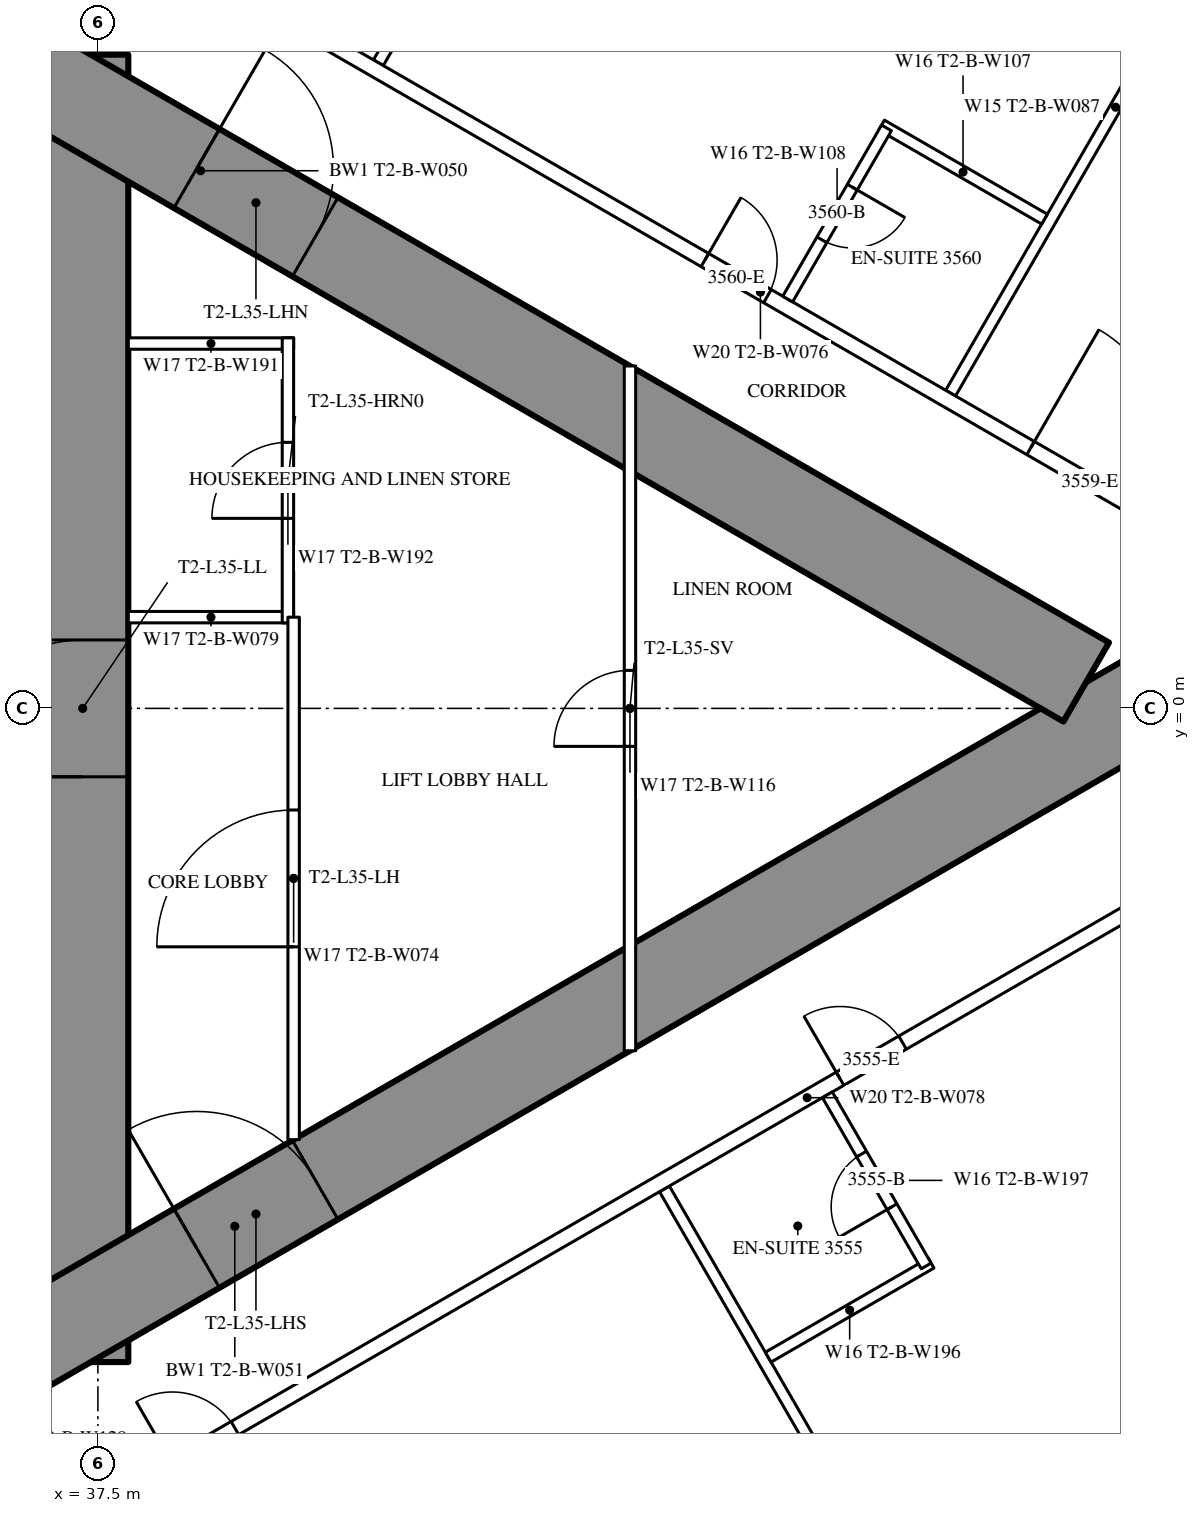
"""IFC4 building model, lengths in metres.
Left out: names, types, materials, properties, quantities, classifications, styles, units other than length and angle.
Written with IfcOpenShell. Run it as: python <this file> out.ifc"""

import sys

from ifc_helpers import new_model, si_unit, direction, frame, frame_2d, origin, place, context, subcontext, project, spatial, rectangle, extrude, element, fill, save


model = new_model("IFC4")
c1 = context("Model", 3, precision=1e-05, world=origin(), true_north=direction((0.0, 1.0)))
c2 = subcontext(c1, "Body", "Model", "MODEL_VIEW")
j1 = project(units=[si_unit("LENGTHUNIT", "METRE"), si_unit("PLANEANGLEUNIT", "RADIAN")], contexts=[c1])
p1 = place(None, origin())
s1 = spatial("IfcSite", under=j1, at=p1, CompositionType="ELEMENT")
p2 = place(p1, origin())
s2 = spatial("IfcBuilding", under=s1, at=p2, CompositionType="ELEMENT")
p3 = place(p2, frame((0.0, 0.0, 132.6)))
s3 = spatial("IfcBuildingStorey", under=s2, at=p3, CompositionType="ELEMENT", Elevation=132.6)
p4 = place(p3, frame((37.3, -8.6, 0.0), z_axis=(0.0, 0.0, 1.0), x_axis=(0.0, 1.0, 0.0)))
e1 = element("IfcWall", 1, at=p4, inside=s3, PredefinedType="SHEAR", context=c2, shape_type="SweptSolid", body=[
    extrude(rectangle(XDim=17.2, YDim=1.2, at=frame_2d((8.6, 0.0))), origin(), (0.0, 0.0, 1.0), 3.5),
])
p5 = place(p4, frame((7.7, 0.0, 0.0)))
e2 = element("IfcOpeningElement", 2, at=p5, cuts=e1, PredefinedType="OPENING", context=c2, shape_type="SweptSolid", body=[
    extrude(rectangle(XDim=1.8, YDim=2.2, at=frame_2d((0.9, 1.1))), frame((0.0, 0.61, 0.0), z_axis=(0.0, -1.0, 0.0), x_axis=(1.0, 0.0, 0.0)), (0.0, 0.0, 1.0), 1.22),
])
p6 = place(p3, frame((27.2, -13.8, 0.0), z_axis=(0.0, 0.0, 1.0), x_axis=(0.866027159892, 0.499996958321, 0.0)))
e3 = element("IfcWall", 3, at=p6, inside=s3, PredefinedType="SHEAR", context=c2, shape_type="SweptSolid", body=[
    extrude(rectangle(XDim=27.947, YDim=1.2, at=frame_2d((13.973, 0.0))), origin(), (0.0, 0.0, 1.0), 3.5),
])
p7 = place(p6, frame((4.6, 0.0, 0.0)))
e4 = element("IfcOpeningElement", 4, at=p7, cuts=e3, PredefinedType="OPENING", context=c2, shape_type="SweptSolid", body=[
    extrude(rectangle(XDim=1.0, YDim=2.2, at=frame_2d((0.5, 1.1))), frame((0.0, 0.61, 0.0), z_axis=(0.0, -1.0, 0.0), x_axis=(1.0, 0.0, 0.0)), (0.0, 0.0, 1.0), 1.22),
])
p8 = place(p6, frame((13.395, 0.0, 0.0)))
e5 = element("IfcOpeningElement", 5, at=p8, cuts=e3, PredefinedType="OPENING", context=c2, shape_type="SweptSolid", body=[
    extrude(rectangle(XDim=1.8, YDim=2.2, at=frame_2d((0.9, 1.1))), frame((0.0, 0.61, 0.0), z_axis=(0.0, -1.0, 0.0), x_axis=(1.0, 0.0, 0.0)), (0.0, 0.0, 1.0), 1.22),
])
p9 = place(p3, frame((27.2, 13.8, 0.0), z_axis=(0.0, 0.0, 1.0), x_axis=(0.866024515034, -0.500001539357, 0.0)))
e6 = element("IfcWall", 6, at=p9, inside=s3, PredefinedType="SHEAR", context=c2, shape_type="SweptSolid", body=[
    extrude(rectangle(XDim=26.907, YDim=1.2, at=frame_2d((13.454, 0.0))), origin(), (0.0, 0.0, 1.0), 3.5),
])
p10 = place(p9, frame((4.6, 0.0, 0.0)))
e7 = element("IfcOpeningElement", 7, at=p10, cuts=e6, PredefinedType="OPENING", context=c2, shape_type="SweptSolid", body=[
    extrude(rectangle(XDim=1.0, YDim=2.2, at=frame_2d((0.5, 1.1))), frame((0.0, 0.61, 0.0), z_axis=(0.0, -1.0, 0.0), x_axis=(1.0, 0.0, 0.0)), (0.0, 0.0, 1.0), 1.22),
])
p11 = place(p9, frame((13.395, 0.0, 0.0)))
e8 = element("IfcOpeningElement", 8, at=p11, cuts=e6, PredefinedType="OPENING", context=c2, shape_type="SweptSolid", body=[
    extrude(rectangle(XDim=1.8, YDim=2.2, at=frame_2d((0.9, 1.1))), frame((0.0, 0.61, 0.0), z_axis=(0.0, -1.0, 0.0), x_axis=(1.0, 0.0, 0.0)), (0.0, 0.0, 1.0), 1.22),
])
p12 = place(p3, frame((44.954, -6.321, 0.0), z_axis=(0.0, 0.0, 1.0), x_axis=(0.500018676722, -0.866014620505, 0.0)))
e9 = element("IfcWall", 9, at=p12, inside=s3, PredefinedType="PARTITIONING", context=c2, shape_type="SweptSolid", body=[
    extrude(rectangle(XDim=8.704, YDim=0.15, at=frame_2d((4.352, 0.0))), origin(), (0.0, 0.0, 1.0), 2.2),
])
p13 = place(p3, frame((41.19, 8.494, 0.0), z_axis=(0.0, 0.0, 1.0), x_axis=(0.49999258054, 0.866029687369, 0.0)))
e10 = element("IfcWall", 10, at=p13, inside=s3, PredefinedType="PARTITIONING", context=c2, shape_type="SweptSolid", body=[
    extrude(rectangle(XDim=11.318, YDim=0.15, at=frame_2d((5.659, 0.0))), origin(), (0.0, 0.0, 1.0), 3.25),
])
p14 = place(p3, frame((48.719, 4.147, 0.0), z_axis=(0.0, 0.0, 1.0), x_axis=(0.499993328235, 0.866029255696, 0.0)))
e11 = element("IfcWall", 11, at=p14, inside=s3, PredefinedType="PARTITIONING", context=c2, shape_type="SweptSolid", body=[
    extrude(rectangle(XDim=8.686, YDim=0.15, at=frame_2d((4.343, 0.0))), origin(), (0.0, 0.0, 1.0), 2.2),
])
p15 = place(p3, frame((37.96, -10.243, 0.0), z_axis=(0.0, 0.0, 1.0), x_axis=(0.866026429433, 0.499998223521, 0.0)))
e12 = element("IfcWall", 12, at=p15, inside=s3, PredefinedType="PARTITIONING", context=c2, shape_type="SweptSolid", body=[
    extrude(rectangle(XDim=20.487, YDim=0.2, at=frame_2d((10.243, 0.0))), origin(), (0.0, 0.0, 1.0), 3.25),
])
p16 = place(p15, frame((10.743, 0.0, 0.0)))
e13 = element("IfcOpeningElement", 13, at=p16, cuts=e12, PredefinedType="OPENING", context=c2, shape_type="SweptSolid", body=[
    extrude(rectangle(XDim=0.95, YDim=2.2, at=frame_2d((0.475, 1.1))), frame((0.0, 0.11, 0.0), z_axis=(0.0, -1.0, 0.0), x_axis=(1.0, 0.0, 0.0)), (0.0, 0.0, 1.0), 0.22),
])
p17 = place(p15, frame((17.586, 0.0, 0.0)))
e14 = element("IfcOpeningElement", 14, at=p17, cuts=e12, PredefinedType="OPENING", context=c2, shape_type="SweptSolid", body=[
    extrude(rectangle(XDim=1.8, YDim=2.2, at=frame_2d((0.9, 1.1))), frame((0.0, 0.11, 0.0), z_axis=(0.0, -1.0, 0.0), x_axis=(1.0, 0.0, 0.0)), (0.0, 0.0, 1.0), 0.22),
])
p18 = place(p15, frame((0.6, 0.0, 0.0)))
e15 = element("IfcOpeningElement", 15, at=p18, cuts=e12, PredefinedType="OPENING", context=c2, shape_type="SweptSolid", body=[
    extrude(rectangle(XDim=0.95, YDim=2.2, at=frame_2d((0.475, 1.1))), frame((0.0, 0.11, 0.0), z_axis=(0.0, -1.0, 0.0), x_axis=(1.0, 0.0, 0.0)), (0.0, 0.0, 1.0), 0.22),
])
p19 = place(p3, frame((36.834, 10.894, 0.0), z_axis=(0.0, 0.0, 1.0), x_axis=(0.866028157229, -0.499995230863, 0.0)))
e16 = element("IfcWall", 16, at=p19, inside=s3, PredefinedType="PARTITIONING", context=c2, shape_type="SweptSolid", body=[
    extrude(rectangle(XDim=21.667, YDim=0.2, at=frame_2d((10.833, 0.0))), origin(), (0.0, 0.0, 1.0), 3.25),
])
p20 = place(p19, frame((20.117, 0.0, 0.0)))
e17 = element("IfcOpeningElement", 17, at=p20, cuts=e16, PredefinedType="OPENING", context=c2, shape_type="SweptSolid", body=[
    extrude(rectangle(XDim=0.95, YDim=2.2, at=frame_2d((0.475, 1.1))), frame((0.0, 0.11, 0.0), z_axis=(0.0, -1.0, 0.0), x_axis=(1.0, 0.0, 0.0)), (0.0, 0.0, 1.0), 0.22),
])
p21 = place(p19, frame((14.938, 0.0, 0.0)))
e18 = element("IfcOpeningElement", 18, at=p21, cuts=e16, PredefinedType="OPENING", context=c2, shape_type="SweptSolid", body=[
    extrude(rectangle(XDim=1.8, YDim=2.2, at=frame_2d((0.9, 1.1))), frame((0.0, 0.11, 0.0), z_axis=(0.0, -1.0, 0.0), x_axis=(1.0, 0.0, 0.0)), (0.0, 0.0, 1.0), 0.22),
])
p22 = place(p19, frame((9.99, 0.0, 0.0)))
e19 = element("IfcOpeningElement", 19, at=p22, cuts=e16, PredefinedType="OPENING", context=c2, shape_type="SweptSolid", body=[
    extrude(rectangle(XDim=0.95, YDim=2.2, at=frame_2d((0.475, 1.1))), frame((0.0, 0.11, 0.0), z_axis=(0.0, -1.0, 0.0), x_axis=(1.0, 0.0, 0.0)), (0.0, 0.0, 1.0), 0.22),
])
p23 = place(p19, frame((3.35, 0.0, 0.0)))
e20 = element("IfcOpeningElement", 20, at=p23, cuts=e16, PredefinedType="OPENING", context=c2, shape_type="SweptSolid", body=[
    extrude(rectangle(XDim=1.0, YDim=2.2, at=frame_2d((0.5, 1.1))), frame((0.0, 0.11, 0.0), z_axis=(0.0, -1.0, 0.0), x_axis=(1.0, 0.0, 0.0)), (0.0, 0.0, 1.0), 0.22),
])
p24 = place(p3, frame((46.319, -8.535, 0.0), z_axis=(0.0, 0.0, 1.0), x_axis=(0.866006523861, 0.500032699561, 0.0)))
e21 = element("IfcWall", 21, at=p24, inside=s3, PredefinedType="PARTITIONING", context=c2, shape_type="SweptSolid", body=[
    extrude(rectangle(XDim=2.475, YDim=0.15, at=frame_2d((1.237, 0.0))), origin(), (0.0, 0.0, 1.0), 3.25),
])
p25 = place(p3, frame((47.097, -5.084, 0.0), z_axis=(0.0, 0.0, 1.0), x_axis=(0.500006934395, -0.866021400173, 0.0)))
e22 = element("IfcWall", 22, at=p25, inside=s3, PredefinedType="PARTITIONING", context=c2, shape_type="SweptSolid", body=[
    extrude(rectangle(XDim=2.6, YDim=0.15, at=frame_2d((1.3, 0.0))), origin(), (0.0, 0.0, 1.0), 3.25),
])
p26 = place(p25, frame((0.9, 0.0, 0.0)))
e23 = element("IfcOpeningElement", 23, at=p26, cuts=e22, PredefinedType="OPENING", context=c2, shape_type="SweptSolid", body=[
    extrude(rectangle(XDim=0.8, YDim=2.2, at=frame_2d((0.4, 1.1))), frame((0.0, 0.085, 0.0), z_axis=(0.0, -1.0, 0.0), x_axis=(1.0, 0.0, 0.0)), (0.0, 0.0, 1.0), 0.17),
])
p27 = place(p3, frame((47.81, 7.674, 0.0), z_axis=(0.0, 0.0, 1.0), x_axis=(0.866031185235, -0.4999899861, 0.0)))
e24 = element("IfcWall", 24, at=p27, inside=s3, PredefinedType="PARTITIONING", context=c2, shape_type="SweptSolid", body=[
    extrude(rectangle(XDim=2.475, YDim=0.15, at=frame_2d((1.238, 0.0))), origin(), (0.0, 0.0, 1.0), 3.25),
])
p28 = place(p3, frame((46.575, 5.385, 0.0), z_axis=(0.0, 0.0, 1.0), x_axis=(0.500006934395, 0.866021400173, 0.0)))
e25 = element("IfcWall", 25, at=p28, inside=s3, PredefinedType="PARTITIONING", context=c2, shape_type="SweptSolid", body=[
    extrude(rectangle(XDim=2.6, YDim=0.15, at=frame_2d((1.3, 0.0))), origin(), (0.0, 0.0, 1.0), 3.25),
])
p29 = place(p28, frame((0.9, 0.0, 0.0)))
e26 = element("IfcOpeningElement", 26, at=p29, cuts=e25, PredefinedType="OPENING", context=c2, shape_type="SweptSolid", body=[
    extrude(rectangle(XDim=0.8, YDim=2.2, at=frame_2d((0.4, 1.1))), frame((0.0, 0.085, 0.0), z_axis=(0.0, -1.0, 0.0), x_axis=(1.0, 0.0, 0.0)), (0.0, 0.0, 1.0), 0.17),
])
for number, where, z_axis, x_axis in (
    (27, (37.9, 1.2, 0.0), (0.0, 0.0, 1.0), (1.0, 0.0, 0.0)),
    (28, (37.9, 4.8, 0.0), (0.0, 0.0, 1.0), (1.0, 0.0, 0.0)),
):
    element("IfcWall", number, at=place(p3, frame(where, z_axis=z_axis, x_axis=x_axis)), inside=s3, PredefinedType="PARTITIONING", context=c2, shape_type="SweptSolid", body=[
        extrude(rectangle(XDim=2.175, YDim=0.15, at=frame_2d((1.087, 0.0))), origin(), (0.0, 0.0, 1.0), 3.25),
    ])
p30 = place(p3, frame((40.0, 1.125, 0.0), z_axis=(0.0, 0.0, 1.0), x_axis=(0.0, 1.0, 0.0)))
e29 = element("IfcWall", 29, at=p30, inside=s3, PredefinedType="PARTITIONING", context=c2, shape_type="SweptSolid", body=[
    extrude(rectangle(XDim=3.75, YDim=0.15, at=frame_2d((1.875, 0.0))), origin(), (0.0, 0.0, 1.0), 3.25),
])
p31 = place(p30, frame((1.375, 0.0, 0.0)))
e30 = element("IfcOpeningElement", 30, at=p31, cuts=e29, PredefinedType="OPENING", context=c2, shape_type="SweptSolid", body=[
    extrude(rectangle(XDim=1.0, YDim=2.2, at=frame_2d((0.5, 1.1))), frame((0.0, 0.085, 0.0), z_axis=(0.0, -1.0, 0.0), x_axis=(1.0, 0.0, 0.0)), (0.0, 0.0, 1.0), 0.17),
])
p32 = place(p3, frame((40.075, -5.674, 0.0), z_axis=(0.0, 0.0, 1.0), x_axis=(0.0, 1.0, 0.0)))
e31 = element("IfcWall", 31, at=p32, inside=s3, PredefinedType="PARTITIONING", context=c2, shape_type="SweptSolid", body=[
    extrude(rectangle(XDim=6.874, YDim=0.15, at=frame_2d((3.437, 0.0))), origin(), (0.0, 0.0, 1.0), 3.25),
])
p33 = place(p32, frame((2.537, 0.0, 0.0)))
e32 = element("IfcOpeningElement", 32, at=p33, cuts=e31, PredefinedType="OPENING", context=c2, shape_type="SweptSolid", body=[
    extrude(rectangle(XDim=1.8, YDim=2.2, at=frame_2d((0.9, 1.1))), frame((0.0, 0.085, 0.0), z_axis=(0.0, -1.0, 0.0), x_axis=(1.0, 0.0, 0.0)), (0.0, 0.0, 1.0), 0.17),
])
p34 = place(p3, frame((44.5, -4.505, 0.0), z_axis=(0.0, 0.0, 1.0), x_axis=(0.0, 1.0, 0.0)))
e33 = element("IfcWall", 33, at=p34, inside=s3, PredefinedType="PARTITIONING", context=c2, shape_type="SweptSolid", body=[
    extrude(rectangle(XDim=9.009, YDim=0.15, at=frame_2d((4.505, 0.0))), origin(), (0.0, 0.0, 1.0), 2.45),
])
p35 = place(p34, frame((4.005, 0.0, 0.0)))
e34 = element("IfcOpeningElement", 34, at=p35, cuts=e33, PredefinedType="OPENING", context=c2, shape_type="SweptSolid", body=[
    extrude(rectangle(XDim=1.0, YDim=2.2, at=frame_2d((0.5, 1.1))), frame((0.0, 0.085, 0.0), z_axis=(0.0, -1.0, 0.0), x_axis=(1.0, 0.0, 0.0)), (0.0, 0.0, 1.0), 0.17),
])
p36 = place(p26, origin())
e35 = element("IfcDoor", 35, at=p36, inside=s3, OperationType="SINGLE_SWING_RIGHT", PredefinedType="DOOR", context=c2, shape_type="SweptSolid", body=[
    extrude(rectangle(XDim=0.8, YDim=2.2, at=frame_2d((0.4, 1.1))), frame((0.0, 0.025, 0.0), z_axis=(0.0, -1.0, 0.0), x_axis=(1.0, 0.0, 0.0)), (0.0, 0.0, 1.0), 0.05),
])
fill(e23, e35)
p37 = place(p16, origin())
e36 = element("IfcDoor", 36, at=p37, inside=s3, OperationType="SINGLE_SWING_LEFT", PredefinedType="DOOR", context=c2, shape_type="SweptSolid", body=[
    extrude(rectangle(XDim=0.95, YDim=2.2, at=frame_2d((0.475, 1.1))), frame((0.0, 0.025, 0.0), z_axis=(0.0, -1.0, 0.0), x_axis=(1.0, 0.0, 0.0)), (0.0, 0.0, 1.0), 0.05),
])
fill(e13, e36)
p38 = place(p21, origin())
e37 = element("IfcDoor", 37, at=p38, inside=s3, OperationType="DOUBLE_DOOR_SINGLE_SWING", PredefinedType="DOOR", context=c2, shape_type="SweptSolid", body=[
    extrude(rectangle(XDim=1.8, YDim=2.2, at=frame_2d((0.9, 1.1))), frame((0.0, 0.025, 0.0), z_axis=(0.0, -1.0, 0.0), x_axis=(1.0, 0.0, 0.0)), (0.0, 0.0, 1.0), 0.05),
])
fill(e18, e37)
p39 = place(p29, origin())
e38 = element("IfcDoor", 38, at=p39, inside=s3, OperationType="SINGLE_SWING_RIGHT", PredefinedType="DOOR", context=c2, shape_type="SweptSolid", body=[
    extrude(rectangle(XDim=0.8, YDim=2.2, at=frame_2d((0.4, 1.1))), frame((0.0, 0.025, 0.0), z_axis=(0.0, -1.0, 0.0), x_axis=(1.0, 0.0, 0.0)), (0.0, 0.0, 1.0), 0.05),
])
fill(e26, e38)
p40 = place(p22, origin())
e39 = element("IfcDoor", 39, at=p40, inside=s3, OperationType="SINGLE_SWING_LEFT", PredefinedType="DOOR", context=c2, shape_type="SweptSolid", body=[
    extrude(rectangle(XDim=0.95, YDim=2.2, at=frame_2d((0.475, 1.1))), frame((0.0, 0.025, 0.0), z_axis=(0.0, -1.0, 0.0), x_axis=(1.0, 0.0, 0.0)), (0.0, 0.0, 1.0), 0.05),
])
fill(e19, e39)
p41 = place(p18, origin())
e40 = element("IfcDoor", 40, at=p41, inside=s3, OperationType="SINGLE_SWING_LEFT", PredefinedType="DOOR", context=c2, shape_type="SweptSolid", body=[
    extrude(rectangle(XDim=0.95, YDim=2.2, at=frame_2d((0.475, 1.1))), frame((0.0, 0.025, 0.0), z_axis=(0.0, -1.0, 0.0), x_axis=(1.0, 0.0, 0.0)), (0.0, 0.0, 1.0), 0.05),
])
fill(e15, e40)
p42 = place(p31, origin())
e41 = element("IfcDoor", 41, at=p42, inside=s3, OperationType="SINGLE_SWING_LEFT", PredefinedType="DOOR", context=c2, shape_type="SweptSolid", body=[
    extrude(rectangle(XDim=1.0, YDim=2.2, at=frame_2d((0.5, 1.1))), frame((0.0, 0.025, 0.0), z_axis=(0.0, -1.0, 0.0), x_axis=(1.0, 0.0, 0.0)), (0.0, 0.0, 1.0), 0.05),
])
fill(e30, e41)
p43 = place(p33, origin())
e42 = element("IfcDoor", 42, at=p43, inside=s3, OperationType="DOUBLE_DOOR_SINGLE_SWING", PredefinedType="DOOR", context=c2, shape_type="SweptSolid", body=[
    extrude(rectangle(XDim=1.8, YDim=2.2, at=frame_2d((0.9, 1.1))), frame((0.0, 0.025, 0.0), z_axis=(0.0, -1.0, 0.0), x_axis=(1.0, 0.0, 0.0)), (0.0, 0.0, 1.0), 0.05),
])
fill(e32, e42)
p44 = place(p35, origin())
e43 = element("IfcDoor", 43, at=p44, inside=s3, OperationType="SINGLE_SWING_LEFT", PredefinedType="DOOR", context=c2, shape_type="SweptSolid", body=[
    extrude(rectangle(XDim=1.0, YDim=2.2, at=frame_2d((0.5, 1.1))), frame((0.0, 0.025, 0.0), z_axis=(0.0, -1.0, 0.0), x_axis=(1.0, 0.0, 0.0)), (0.0, 0.0, 1.0), 0.05),
])
fill(e34, e43)
p45 = place(p8, origin())
e44 = element("IfcDoor", 44, at=p45, inside=s3, OperationType="DOUBLE_DOOR_SINGLE_SWING", PredefinedType="DOOR", context=c2, shape_type="SweptSolid", body=[
    extrude(rectangle(XDim=1.8, YDim=2.2, at=frame_2d((0.9, 1.1))), frame((0.0, 0.025, 0.0), z_axis=(0.0, -1.0, 0.0), x_axis=(1.0, 0.0, 0.0)), (0.0, 0.0, 1.0), 0.05),
])
fill(e5, e44)
p46 = place(p11, origin())
e45 = element("IfcDoor", 45, at=p46, inside=s3, OperationType="DOUBLE_DOOR_SINGLE_SWING", PredefinedType="DOOR", context=c2, shape_type="SweptSolid", body=[
    extrude(rectangle(XDim=1.8, YDim=2.2, at=frame_2d((0.9, 1.1))), frame((0.0, 0.025, 0.0), z_axis=(0.0, -1.0, 0.0), x_axis=(1.0, 0.0, 0.0)), (0.0, 0.0, 1.0), 0.05),
])
fill(e8, e45)
p47 = place(p5, origin())
e46 = element("IfcDoor", 46, at=p47, inside=s3, OperationType="DOUBLE_DOOR_SINGLE_SWING", PredefinedType="DOOR", context=c2, shape_type="SweptSolid", body=[
    extrude(rectangle(XDim=1.8, YDim=2.2, at=frame_2d((0.9, 1.1))), frame((0.0, 0.025, 0.0), z_axis=(0.0, -1.0, 0.0), x_axis=(1.0, 0.0, 0.0)), (0.0, 0.0, 1.0), 0.05),
])
fill(e2, e46)
save(model, sys.argv[1])
